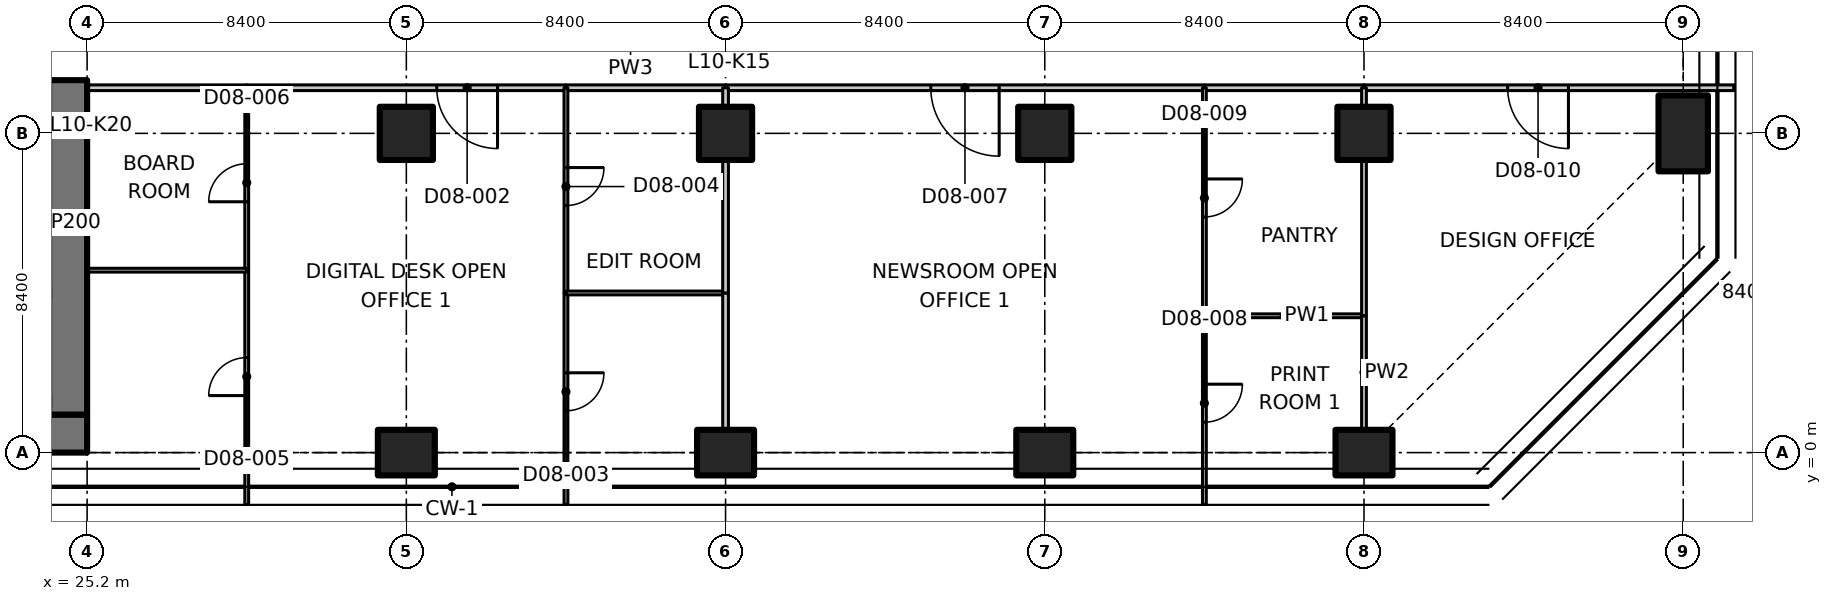
"""IFC4 building model, lengths in metres.
Left out: names, types, materials, properties, quantities, classifications, styles, units other than length and angle.
Written with IfcOpenShell. Run it as: python <this file> out.ifc"""

import sys

from ifc_helpers import new_model, si_unit, direction, frame, frame_2d, origin, origin_2d, place, context, subcontext, project, spatial, polyline, rectangle, outline, extrude, element, fill, save


model = new_model("IFC4")
c1 = context("Model", 3, precision=1e-05, world=origin(), true_north=direction((0.0, 1.0)))
c2 = subcontext(c1, "Body", "Model", "MODEL_VIEW")
j1 = project(units=[si_unit("LENGTHUNIT", "METRE"), si_unit("PLANEANGLEUNIT", "RADIAN")], contexts=[c1])
p1 = place(None, origin())
s1 = spatial("IfcSite", under=j1, at=p1, CompositionType="ELEMENT")
p2 = place(p1, origin())
s2 = spatial("IfcBuilding", under=s1, at=p2, CompositionType="ELEMENT")
p3 = place(p2, frame((0.0, 0.0, 50.9)))
s3 = spatial("IfcBuildingStorey", under=s2, at=p3, CompositionType="ELEMENT", Elevation=50.9)
p4 = place(p3, frame((33.6, 0.0, 0.0), z_axis=(0.0, 0.0, 1.0), x_axis=(0.0, 1.0, 0.0)))
e1 = element("IfcColumn", 1, at=p4, inside=s3, PredefinedType="COLUMN", context=c2, shape_type="SweptSolid", body=[
    extrude(rectangle(XDim=1.2, YDim=1.5, at=origin_2d()), origin(), (0.0, 0.0, 1.0), 3.35),
])
p5 = place(p3, frame((33.6, 8.4, 0.0), z_axis=(0.0, 0.0, 1.0), x_axis=(1.0, 0.0, 0.0)))
e2 = element("IfcColumn", 2, at=p5, inside=s3, PredefinedType="COLUMN", context=c2, shape_type="SweptSolid", body=[
    extrude(rectangle(XDim=1.4, YDim=1.4, at=origin_2d()), origin(), (0.0, 0.0, 1.0), 3.35),
])
p6 = place(p3, frame((42.0, 0.0, 0.0), z_axis=(0.0, 0.0, 1.0), x_axis=(0.0, 1.0, 0.0)))
e3 = element("IfcColumn", 3, at=p6, inside=s3, PredefinedType="COLUMN", context=c2, shape_type="SweptSolid", body=[
    extrude(rectangle(XDim=1.2, YDim=1.5, at=origin_2d()), origin(), (0.0, 0.0, 1.0), 3.35),
])
p7 = place(p3, frame((42.0, 8.4, 0.0), z_axis=(0.0, 0.0, 1.0), x_axis=(1.0, 0.0, 0.0)))
e4 = element("IfcColumn", 4, at=p7, inside=s3, PredefinedType="COLUMN", context=c2, shape_type="SweptSolid", body=[
    extrude(rectangle(XDim=1.4, YDim=1.4, at=origin_2d()), origin(), (0.0, 0.0, 1.0), 3.35),
])
p8 = place(p3, frame((50.4, 0.0, 0.0), z_axis=(0.0, 0.0, 1.0), x_axis=(0.0, 1.0, 0.0)))
e5 = element("IfcColumn", 5, at=p8, inside=s3, PredefinedType="COLUMN", context=c2, shape_type="SweptSolid", body=[
    extrude(rectangle(XDim=1.2, YDim=1.5, at=origin_2d()), origin(), (0.0, 0.0, 1.0), 3.35),
])
p9 = place(p3, frame((50.4, 8.4, 0.0), z_axis=(0.0, 0.0, 1.0), x_axis=(1.0, 0.0, 0.0)))
e6 = element("IfcColumn", 6, at=p9, inside=s3, PredefinedType="COLUMN", context=c2, shape_type="SweptSolid", body=[
    extrude(rectangle(XDim=1.4, YDim=1.4, at=origin_2d()), origin(), (0.0, 0.0, 1.0), 3.35),
])
p10 = place(p3, frame((58.8, 0.0, 0.0), z_axis=(0.0, 0.0, 1.0), x_axis=(0.0, 1.0, 0.0)))
e7 = element("IfcColumn", 7, at=p10, inside=s3, PredefinedType="COLUMN", context=c2, shape_type="SweptSolid", body=[
    extrude(rectangle(XDim=1.2, YDim=1.5, at=origin_2d()), origin(), (0.0, 0.0, 1.0), 3.35),
])
p11 = place(p3, frame((58.8, 8.4, 0.0), z_axis=(0.0, 0.0, 1.0), x_axis=(1.0, 0.0, 0.0)))
e8 = element("IfcColumn", 8, at=p11, inside=s3, PredefinedType="COLUMN", context=c2, shape_type="SweptSolid", body=[
    extrude(rectangle(XDim=1.4, YDim=1.4, at=origin_2d()), origin(), (0.0, 0.0, 1.0), 3.35),
])
p12 = place(p3, frame((67.2, 8.4, 0.0), z_axis=(0.0, 0.0, 1.0), x_axis=(1.0, 0.0, 0.0)))
e9 = element("IfcColumn", 9, at=p12, inside=s3, PredefinedType="COLUMN", context=c2, shape_type="SweptSolid", body=[
    extrude(rectangle(XDim=1.3, YDim=2.0, at=origin_2d()), origin(), (0.0, 0.0, 1.0), 3.35),
])
p13 = place(p3, frame((6.936, 0.5, 0.0), z_axis=(0.0, 0.0, 1.0), x_axis=(1.0, 0.0, 0.0)))
e10 = element("IfcWall", 10, at=p13, inside=s3, PredefinedType="SHEAR", context=c2, shape_type="SweptSolid", body=[
    extrude(rectangle(XDim=18.264, YDim=1.0, at=frame_2d((9.132, 0.0))), origin(), (0.0, 0.0, 1.0), 3.35),
])
p14 = place(p3, frame((24.7, 1.0, 0.0), z_axis=(0.0, 0.0, 1.0), x_axis=(0.0, 1.0, 0.0)))
e11 = element("IfcWall", 11, at=p14, inside=s3, PredefinedType="SHEAR", context=c2, shape_type="SweptSolid", body=[
    extrude(rectangle(XDim=8.8, YDim=1.0, at=frame_2d((4.4, 0.0))), origin(), (0.0, 0.0, 1.0), 3.35),
])
p15 = place(p3, frame((29.4, 9.6, 0.0), z_axis=(0.0, 0.0, 1.0), x_axis=(-1.0, 0.0, 0.0)))
e12 = element("IfcWall", 12, at=p15, inside=s3, PredefinedType="PARTITIONING", context=c2, shape_type="SweptSolid", body=[
    extrude(rectangle(XDim=4.2, YDim=0.15, at=frame_2d((2.1, 0.0))), origin(), (0.0, 0.0, 1.0), 3.33),
])
p16 = place(p3, frame((37.8, 9.6, 0.0), z_axis=(0.0, 0.0, 1.0), x_axis=(-1.0, 0.0, 0.0)))
e13 = element("IfcWall", 13, at=p16, inside=s3, PredefinedType="PARTITIONING", context=c2, shape_type="SweptSolid", body=[
    extrude(rectangle(XDim=8.4, YDim=0.15, at=frame_2d((4.2, 0.0))), origin(), (0.0, 0.0, 1.0), 3.33),
])
p17 = place(p16, frame((1.8, 0.0, 0.0)))
e14 = element("IfcOpeningElement", 14, at=p17, cuts=e13, PredefinedType="OPENING", context=c2, shape_type="SweptSolid", body=[
    extrude(rectangle(XDim=1.6, YDim=2.1, at=frame_2d((0.8, 1.05))), frame((0.0, 0.085, 0.0), z_axis=(0.0, -1.0, 0.0), x_axis=(1.0, 0.0, 0.0)), (0.0, 0.0, 1.0), 0.17),
])
p18 = place(p3, frame((42.0, 9.6, 0.0), z_axis=(0.0, 0.0, 1.0), x_axis=(-1.0, 0.0, 0.0)))
e15 = element("IfcWall", 15, at=p18, inside=s3, PredefinedType="PARTITIONING", context=c2, shape_type="SweptSolid", body=[
    extrude(rectangle(XDim=4.2, YDim=0.15, at=frame_2d((2.1, 0.0))), origin(), (0.0, 0.0, 1.0), 3.33),
])
p19 = place(p3, frame((54.6, 9.6, 0.0), z_axis=(0.0, 0.0, 1.0), x_axis=(-1.0, 0.0, 0.0)))
e16 = element("IfcWall", 16, at=p19, inside=s3, PredefinedType="PARTITIONING", context=c2, shape_type="SweptSolid", body=[
    extrude(rectangle(XDim=12.6, YDim=0.15, at=frame_2d((6.3, 0.0))), origin(), (0.0, 0.0, 1.0), 3.33),
])
p20 = place(p19, frame((5.4, 0.0, 0.0)))
e17 = element("IfcOpeningElement", 17, at=p20, cuts=e16, PredefinedType="OPENING", context=c2, shape_type="SweptSolid", body=[
    extrude(rectangle(XDim=1.8, YDim=2.1, at=frame_2d((0.9, 1.05))), frame((0.0, 0.085, 0.0), z_axis=(0.0, -1.0, 0.0), x_axis=(1.0, 0.0, 0.0)), (0.0, 0.0, 1.0), 0.17),
])
p21 = place(p3, frame((58.8, 9.6, 0.0), z_axis=(0.0, 0.0, 1.0), x_axis=(-1.0, 0.0, 0.0)))
e18 = element("IfcWall", 18, at=p21, inside=s3, PredefinedType="PARTITIONING", context=c2, shape_type="SweptSolid", body=[
    extrude(rectangle(XDim=4.2, YDim=0.15, at=frame_2d((2.1, 0.0))), origin(), (0.0, 0.0, 1.0), 3.33),
])
p22 = place(p3, frame((68.531, 9.6, 0.0), z_axis=(0.0, 0.0, 1.0), x_axis=(-1.0, 0.0, 0.0)))
e19 = element("IfcWall", 19, at=p22, inside=s3, PredefinedType="PARTITIONING", context=c2, shape_type="SweptSolid", body=[
    extrude(outline(polyline([(0.0, 0.0), (9.73, 0.0), (9.73, 3.33), (1.781, 3.33), (1.779, 2.98), (0.883, 2.98), (0.881, 3.33), (0.25, 3.33), (0.0, 3.33), (0.0, 0.0)])), frame((0.0, 0.075, 0.0), z_axis=(0.0, -1.0, 0.0), x_axis=(1.0, 0.0, 0.0)), (0.0, 0.0, 1.0), 0.15),
])
p23 = place(p22, frame((4.351, 0.0, 0.0)))
e20 = element("IfcOpeningElement", 20, at=p23, cuts=e19, PredefinedType="OPENING", context=c2, shape_type="SweptSolid", body=[
    extrude(rectangle(XDim=1.6, YDim=2.1, at=frame_2d((0.8, 1.05))), frame((0.0, 0.085, 0.0), z_axis=(0.0, -1.0, 0.0), x_axis=(1.0, 0.0, 0.0)), (0.0, 0.0, 1.0), 0.17),
])
p24 = place(p3, frame((37.8, 4.2, 0.0), z_axis=(0.0, 0.0, 1.0), x_axis=(0.0, -1.0, 0.0)))
e21 = element("IfcWall", 21, at=p24, inside=s3, PredefinedType="PARTITIONING", context=c2, shape_type="SweptSolid", body=[
    extrude(outline(polyline([(0.0, 0.0), (5.565, 0.0), (5.565, 3.33), (5.3, 3.33), (4.65, 3.33), (4.648, 2.98), (3.752, 2.98), (3.75, 3.33), (0.0, 3.33), (0.0, 0.0)])), frame((0.0, 0.05, 0.0), z_axis=(0.0, -1.0, 0.0), x_axis=(1.0, 0.0, 0.0)), (0.0, 0.0, 1.0), 0.1),
])
p25 = place(p24, frame((2.1, 0.0, 0.0)))
e22 = element("IfcOpeningElement", 22, at=p25, cuts=e21, PredefinedType="OPENING", context=c2, shape_type="SweptSolid", body=[
    extrude(rectangle(XDim=1.0, YDim=2.1, at=frame_2d((0.5, 1.05))), frame((0.0, 0.06, 0.0), z_axis=(0.0, -1.0, 0.0), x_axis=(1.0, 0.0, 0.0)), (0.0, 0.0, 1.0), 0.12),
])
p26 = place(p3, frame((37.8, 9.6, 0.0), z_axis=(0.0, 0.0, 1.0), x_axis=(0.0, -1.0, 0.0)))
e23 = element("IfcWall", 23, at=p26, inside=s3, PredefinedType="PARTITIONING", context=c2, shape_type="SweptSolid", body=[
    extrude(rectangle(XDim=5.4, YDim=0.1, at=frame_2d((2.7, 0.0))), origin(), (0.0, 0.0, 1.0), 3.33),
])
p27 = place(p26, frame((2.1, 0.0, 0.0)))
e24 = element("IfcOpeningElement", 24, at=p27, cuts=e23, PredefinedType="OPENING", context=c2, shape_type="SweptSolid", body=[
    extrude(rectangle(XDim=1.0, YDim=2.1, at=frame_2d((0.5, 1.05))), frame((0.0, 0.06, 0.0), z_axis=(0.0, -1.0, 0.0), x_axis=(1.0, 0.0, 0.0)), (0.0, 0.0, 1.0), 0.12),
])
p28 = place(p3, frame((29.4, -1.365, 0.0), z_axis=(0.0, 0.0, 1.0), x_axis=(0.0, 1.0, 0.0)))
e25 = element("IfcWall", 25, at=p28, inside=s3, PredefinedType="PARTITIONING", context=c2, shape_type="SweptSolid", body=[
    extrude(outline(polyline([(0.0, 0.0), (6.165, 0.0), (6.165, 3.33), (1.815, 3.33), (1.813, 2.98), (0.917, 2.98), (0.915, 3.33), (0.265, 3.33), (0.0, 3.33), (0.0, 0.0)])), frame((0.0, 0.05, 0.0), z_axis=(0.0, -1.0, 0.0), x_axis=(1.0, 0.0, 0.0)), (0.0, 0.0, 1.0), 0.1),
])
p29 = place(p28, frame((2.865, 0.0, 0.0)))
e26 = element("IfcOpeningElement", 26, at=p29, cuts=e25, PredefinedType="OPENING", context=c2, shape_type="SweptSolid", body=[
    extrude(rectangle(XDim=1.0, YDim=2.1, at=frame_2d((0.5, 1.05))), frame((0.0, 0.06, 0.0), z_axis=(0.0, -1.0, 0.0), x_axis=(1.0, 0.0, 0.0)), (0.0, 0.0, 1.0), 0.12),
])
p30 = place(p3, frame((29.4, 4.8, 0.0), z_axis=(0.0, 0.0, 1.0), x_axis=(0.0, 1.0, 0.0)))
e27 = element("IfcWall", 27, at=p30, inside=s3, PredefinedType="PARTITIONING", context=c2, shape_type="SweptSolid", body=[
    extrude(rectangle(XDim=4.8, YDim=0.1, at=frame_2d((2.4, 0.0))), origin(), (0.0, 0.0, 1.0), 3.33),
])
p31 = place(p30, frame((1.8, 0.0, 0.0)))
e28 = element("IfcOpeningElement", 28, at=p31, cuts=e27, PredefinedType="OPENING", context=c2, shape_type="SweptSolid", body=[
    extrude(rectangle(XDim=1.0, YDim=2.1, at=frame_2d((0.5, 1.05))), frame((0.0, 0.06, 0.0), z_axis=(0.0, -1.0, 0.0), x_axis=(1.0, 0.0, 0.0)), (0.0, 0.0, 1.0), 0.12),
])
p32 = place(p3, frame((37.8, 4.2, 0.0), z_axis=(0.0, 0.0, 1.0), x_axis=(1.0, 0.0, 0.0)))
e29 = element("IfcWall", 29, at=p32, inside=s3, PredefinedType="PARTITIONING", context=c2, shape_type="SweptSolid", body=[
    extrude(rectangle(XDim=4.2, YDim=0.1, at=frame_2d((2.1, 0.0))), origin(), (0.0, 0.0, 1.0), 3.33),
])
p33 = place(p3, frame((42.0, 4.2, 0.0), z_axis=(0.0, 0.0, 1.0), x_axis=(0.0, -1.0, 0.0)))
e30 = element("IfcWall", 30, at=p33, inside=s3, PredefinedType="PARTITIONING", context=c2, shape_type="SweptSolid", body=[
    extrude(rectangle(XDim=3.58, YDim=0.15, at=frame_2d((1.79, 0.0))), origin(), (0.0, 0.0, 1.0), 3.33),
])
p34 = place(p3, frame((42.0, 9.6, 0.0), z_axis=(0.0, 0.0, 1.0), x_axis=(0.0, -1.0, 0.0)))
e31 = element("IfcWall", 31, at=p34, inside=s3, PredefinedType="PARTITIONING", context=c2, shape_type="SweptSolid", body=[
    extrude(rectangle(XDim=0.48, YDim=0.15, at=frame_2d((0.24, 0.0))), origin(), (0.0, 0.0, 1.0), 3.33),
])
p35 = place(p3, frame((42.0, 7.68, 0.0), z_axis=(0.0, 0.0, 1.0), x_axis=(0.0, -1.0, 0.0)))
e32 = element("IfcWall", 32, at=p35, inside=s3, PredefinedType="PARTITIONING", context=c2, shape_type="SweptSolid", body=[
    extrude(rectangle(XDim=3.48, YDim=0.15, at=frame_2d((1.74, 0.0))), origin(), (0.0, 0.0, 1.0), 3.33),
])
p36 = place(p3, frame((25.2, 4.8, 0.0), z_axis=(0.0, 0.0, 1.0), x_axis=(1.0, 0.0, 0.0)))
e33 = element("IfcWall", 33, at=p36, inside=s3, PredefinedType="PARTITIONING", context=c2, shape_type="SweptSolid", body=[
    extrude(rectangle(XDim=4.2, YDim=0.1, at=frame_2d((2.1, 0.0))), origin(), (0.0, 0.0, 1.0), 3.33),
])
p37 = place(p3, frame((54.6, 3.6, 0.0), z_axis=(0.0, 0.0, 1.0), x_axis=(0.0, -1.0, 0.0)))
e34 = element("IfcWall", 34, at=p37, inside=s3, PredefinedType="PARTITIONING", context=c2, shape_type="SweptSolid", body=[
    extrude(outline(polyline([(0.0, 0.0), (4.965, 0.0), (4.965, 3.33), (4.7, 3.33), (4.05, 3.33), (4.048, 2.98), (3.152, 2.98), (3.15, 3.33), (0.0, 3.33), (0.0, 0.0)])), frame((0.0, 0.05, 0.0), z_axis=(0.0, -1.0, 0.0), x_axis=(1.0, 0.0, 0.0)), (0.0, 0.0, 1.0), 0.1),
])
p38 = place(p37, frame((1.8, 0.0, 0.0)))
e35 = element("IfcOpeningElement", 35, at=p38, cuts=e34, PredefinedType="OPENING", context=c2, shape_type="SweptSolid", body=[
    extrude(rectangle(XDim=1.0, YDim=2.1, at=frame_2d((0.5, 1.05))), frame((0.0, 0.06, 0.0), z_axis=(0.0, -1.0, 0.0), x_axis=(1.0, 0.0, 0.0)), (0.0, 0.0, 1.0), 0.12),
])
p39 = place(p3, frame((54.6, 9.6, 0.0), z_axis=(0.0, 0.0, 1.0), x_axis=(0.0, -1.0, 0.0)))
e36 = element("IfcWall", 36, at=p39, inside=s3, PredefinedType="PARTITIONING", context=c2, shape_type="SweptSolid", body=[
    extrude(rectangle(XDim=6.0, YDim=0.1, at=frame_2d((3.0, 0.0))), origin(), (0.0, 0.0, 1.0), 3.33),
])
p40 = place(p39, frame((2.4, 0.0, 0.0)))
e37 = element("IfcOpeningElement", 37, at=p40, cuts=e36, PredefinedType="OPENING", context=c2, shape_type="SweptSolid", body=[
    extrude(rectangle(XDim=1.0, YDim=2.1, at=frame_2d((0.5, 1.05))), frame((0.0, 0.06, 0.0), z_axis=(0.0, -1.0, 0.0), x_axis=(1.0, 0.0, 0.0)), (0.0, 0.0, 1.0), 0.12),
])
p41 = place(p3, frame((54.6, 3.6, 0.0), z_axis=(0.0, 0.0, 1.0), x_axis=(1.0, 0.0, 0.0)))
e38 = element("IfcWall", 38, at=p41, inside=s3, PredefinedType="PARTITIONING", context=c2, shape_type="SweptSolid", body=[
    extrude(rectangle(XDim=4.2, YDim=0.1, at=frame_2d((2.1, 0.0))), origin(), (0.0, 0.0, 1.0), 3.33),
])
p42 = place(p3, frame((58.8, 3.6, 0.0), z_axis=(0.0, 0.0, 1.0), x_axis=(0.0, -1.0, 0.0)))
e39 = element("IfcWall", 39, at=p42, inside=s3, PredefinedType="PARTITIONING", context=c2, shape_type="SweptSolid", body=[
    extrude(rectangle(XDim=2.98, YDim=0.125, at=frame_2d((1.49, 0.0))), origin(), (0.0, 0.0, 1.0), 3.33),
])
p43 = place(p3, frame((58.8, 9.6, 0.0), z_axis=(0.0, 0.0, 1.0), x_axis=(0.0, -1.0, 0.0)))
e40 = element("IfcWall", 40, at=p43, inside=s3, PredefinedType="PARTITIONING", context=c2, shape_type="SweptSolid", body=[
    extrude(rectangle(XDim=0.48, YDim=0.125, at=frame_2d((0.24, 0.0))), origin(), (0.0, 0.0, 1.0), 3.33),
])
p44 = place(p3, frame((58.8, 7.68, 0.0), z_axis=(0.0, 0.0, 1.0), x_axis=(0.0, -1.0, 0.0)))
e41 = element("IfcWall", 41, at=p44, inside=s3, PredefinedType="PARTITIONING", context=c2, shape_type="SweptSolid", body=[
    extrude(rectangle(XDim=4.08, YDim=0.125, at=frame_2d((2.04, 0.0))), origin(), (0.0, 0.0, 1.0), 3.33),
])
p45 = place(p17, origin())
e42 = element("IfcDoor", 42, at=p45, inside=s3, OperationType="DOUBLE_DOOR_SINGLE_SWING", PredefinedType="DOOR", context=c2, shape_type="SweptSolid", body=[
    extrude(rectangle(XDim=1.6, YDim=2.1, at=frame_2d((0.8, 1.05))), frame((0.0, 0.025, 0.0), z_axis=(0.0, -1.0, 0.0), x_axis=(1.0, 0.0, 0.0)), (0.0, 0.0, 1.0), 0.05),
])
fill(e14, e42)
p46 = place(p25, origin())
e43 = element("IfcDoor", 43, at=p46, inside=s3, OperationType="SINGLE_SWING_LEFT", PredefinedType="DOOR", context=c2, shape_type="SweptSolid", body=[
    extrude(rectangle(XDim=1.0, YDim=2.1, at=frame_2d((0.5, 1.05))), frame((0.0, 0.025, 0.0), z_axis=(0.0, -1.0, 0.0), x_axis=(1.0, 0.0, 0.0)), (0.0, 0.0, 1.0), 0.05),
])
fill(e22, e43)
p47 = place(p27, origin())
e44 = element("IfcDoor", 44, at=p47, inside=s3, OperationType="SINGLE_SWING_LEFT", PredefinedType="DOOR", context=c2, shape_type="SweptSolid", body=[
    extrude(rectangle(XDim=1.0, YDim=2.1, at=frame_2d((0.5, 1.05))), frame((0.0, 0.025, 0.0), z_axis=(0.0, -1.0, 0.0), x_axis=(1.0, 0.0, 0.0)), (0.0, 0.0, 1.0), 0.05),
])
fill(e24, e44)
p48 = place(p29, origin())
e45 = element("IfcDoor", 45, at=p48, inside=s3, OperationType="SINGLE_SWING_LEFT", PredefinedType="DOOR", context=c2, shape_type="SweptSolid", body=[
    extrude(rectangle(XDim=1.0, YDim=2.1, at=frame_2d((0.5, 1.05))), frame((0.0, 0.025, 0.0), z_axis=(0.0, -1.0, 0.0), x_axis=(1.0, 0.0, 0.0)), (0.0, 0.0, 1.0), 0.05),
])
fill(e26, e45)
p49 = place(p31, origin())
e46 = element("IfcDoor", 46, at=p49, inside=s3, OperationType="SINGLE_SWING_LEFT", PredefinedType="DOOR", context=c2, shape_type="SweptSolid", body=[
    extrude(rectangle(XDim=1.0, YDim=2.1, at=frame_2d((0.5, 1.05))), frame((0.0, 0.025, 0.0), z_axis=(0.0, -1.0, 0.0), x_axis=(1.0, 0.0, 0.0)), (0.0, 0.0, 1.0), 0.05),
])
fill(e28, e46)
p50 = place(p20, origin())
e47 = element("IfcDoor", 47, at=p50, inside=s3, OperationType="DOUBLE_DOOR_SINGLE_SWING", PredefinedType="DOOR", context=c2, shape_type="SweptSolid", body=[
    extrude(rectangle(XDim=1.8, YDim=2.1, at=frame_2d((0.9, 1.05))), frame((0.0, 0.025, 0.0), z_axis=(0.0, -1.0, 0.0), x_axis=(1.0, 0.0, 0.0)), (0.0, 0.0, 1.0), 0.05),
])
fill(e17, e47)
p51 = place(p38, origin())
e48 = element("IfcDoor", 48, at=p51, inside=s3, OperationType="SINGLE_SWING_LEFT", PredefinedType="DOOR", context=c2, shape_type="SweptSolid", body=[
    extrude(rectangle(XDim=1.0, YDim=2.1, at=frame_2d((0.5, 1.05))), frame((0.0, 0.025, 0.0), z_axis=(0.0, -1.0, 0.0), x_axis=(1.0, 0.0, 0.0)), (0.0, 0.0, 1.0), 0.05),
])
fill(e35, e48)
p52 = place(p40, origin())
e49 = element("IfcDoor", 49, at=p52, inside=s3, OperationType="SINGLE_SWING_LEFT", PredefinedType="DOOR", context=c2, shape_type="SweptSolid", body=[
    extrude(rectangle(XDim=1.0, YDim=2.1, at=frame_2d((0.5, 1.05))), frame((0.0, 0.025, 0.0), z_axis=(0.0, -1.0, 0.0), x_axis=(1.0, 0.0, 0.0)), (0.0, 0.0, 1.0), 0.05),
])
fill(e37, e49)
p53 = place(p23, origin())
e50 = element("IfcDoor", 50, at=p53, inside=s3, OperationType="DOUBLE_DOOR_SINGLE_SWING", PredefinedType="DOOR", context=c2, shape_type="SweptSolid", body=[
    extrude(rectangle(XDim=1.6, YDim=2.1, at=frame_2d((0.8, 1.05))), frame((0.0, 0.025, 0.0), z_axis=(0.0, -1.0, 0.0), x_axis=(1.0, 0.0, 0.0)), (0.0, 0.0, 1.0), 0.05),
])
fill(e20, e50)
save(model, sys.argv[1])
